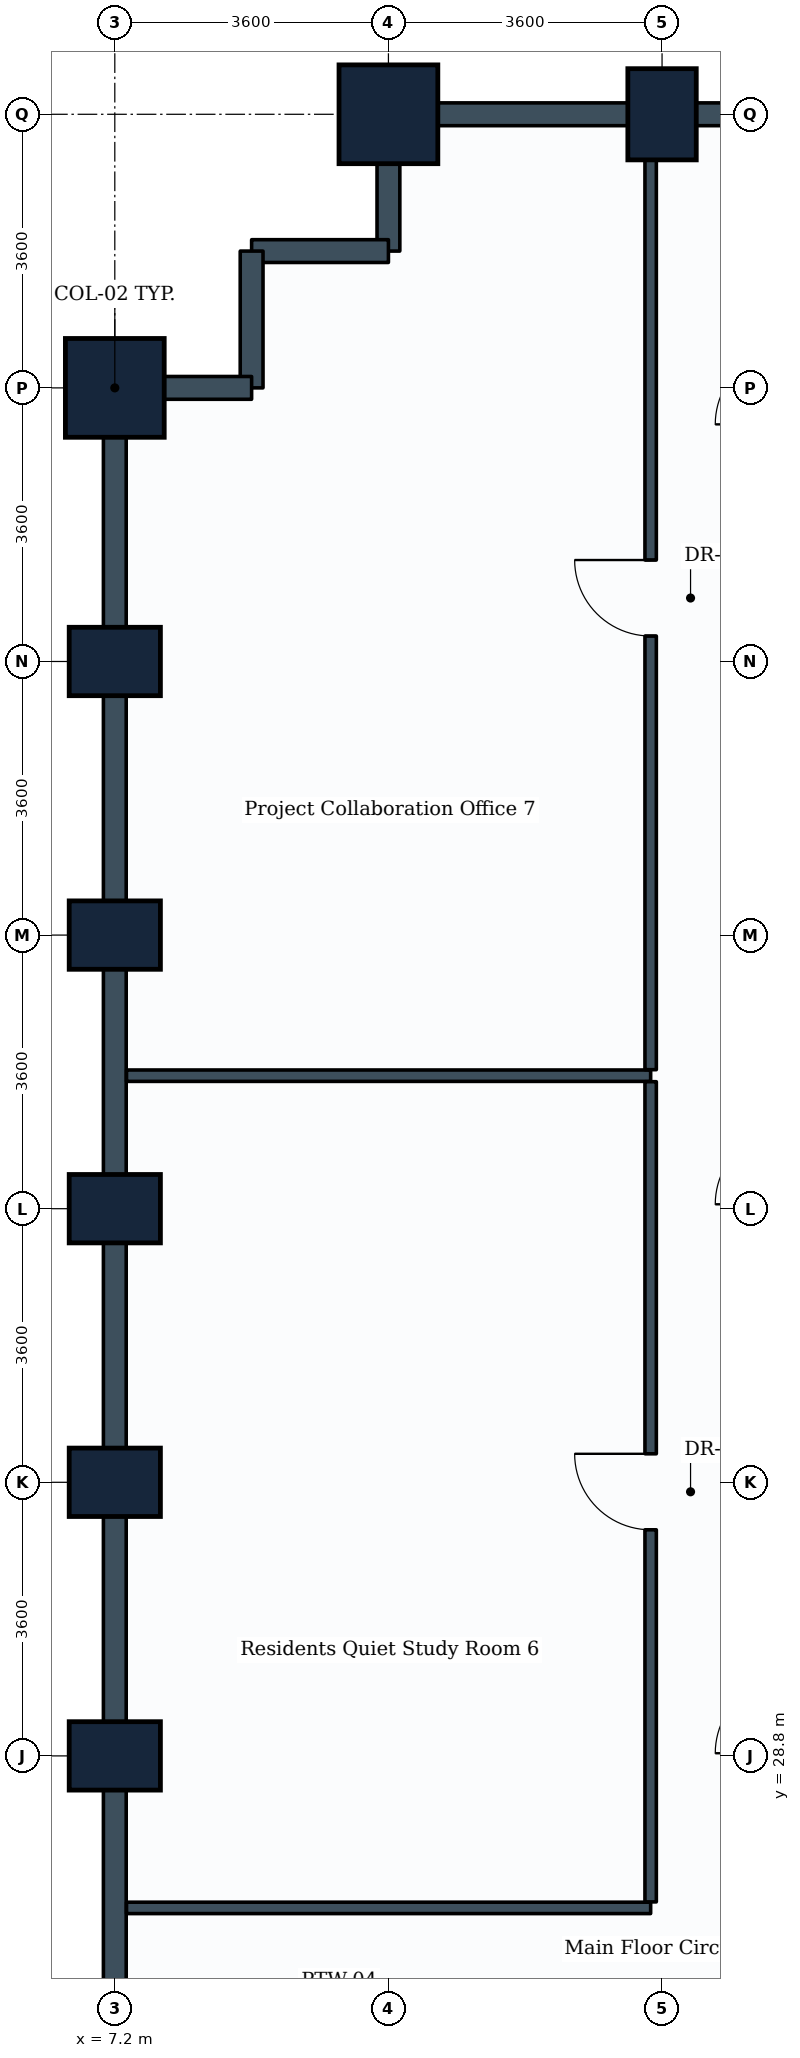
"""IFC4 building model, lengths in metres.
Left out: names, types, materials, properties, quantities, classifications, styles, units other than length and angle.
Written with IfcOpenShell. Run it as: python <this file> out.ifc"""

import sys

from ifc_helpers import new_model, si_unit, direction, frame, frame_2d, origin, origin_2d, place, context, subcontext, project, spatial, rectangle, extrude, element, fill, save


model = new_model("IFC4")
c1 = context("Model", 3, precision=1e-05, world=origin(), true_north=direction((0.0, 1.0)))
c2 = subcontext(c1, "Body", "Model", "MODEL_VIEW")
j1 = project(units=[si_unit("LENGTHUNIT", "METRE"), si_unit("PLANEANGLEUNIT", "RADIAN")], contexts=[c1])
p1 = place(None, origin())
s1 = spatial("IfcSite", under=j1, at=p1, CompositionType="ELEMENT")
p2 = place(p1, origin())
s2 = spatial("IfcBuilding", under=s1, at=p2, CompositionType="ELEMENT")
p3 = place(p2, frame((0.0, 0.0, 66.9)))
s3 = spatial("IfcBuildingStorey", under=s2, at=p3, CompositionType="ELEMENT", Elevation=66.9)
for number, where, z_axis, x_axis in (
    (1, (7.2, 28.8, 0.0), (0.0, 0.0, 1.0), (0.0, 1.0, 0.0)),
    (2, (7.2, 32.4, 0.0), (0.0, 0.0, 1.0), (0.0, 1.0, 0.0)),
    (3, (7.2, 36.0, 0.0), (0.0, 0.0, 1.0), (0.0, 1.0, 0.0)),
    (4, (7.2, 39.6, 0.0), (0.0, 0.0, 1.0), (0.0, 1.0, 0.0)),
    (5, (7.2, 43.2, 0.0), (0.0, 0.0, 1.0), (0.0, 1.0, 0.0)),
):
    element("IfcColumn", number, at=place(p3, frame(where, z_axis=z_axis, x_axis=x_axis)), inside=s3, PredefinedType="COLUMN", context=c2, shape_type="SweptSolid", body=[
        extrude(rectangle(XDim=0.9, YDim=1.2, at=origin_2d()), origin(), (0.0, 0.0, 1.0), 3.9),
    ])
for number, where, z_axis, x_axis in (
    (6, (7.2, 46.8, 0.0), (0.0, 0.0, 1.0), (0.0, 1.0, 0.0)),
    (7, (10.8, 50.4, 0.0), (0.0, 0.0, 1.0), (1.0, 0.0, 0.0)),
):
    element("IfcColumn", number, at=place(p3, frame(where, z_axis=z_axis, x_axis=x_axis)), inside=s3, PredefinedType="COLUMN", context=c2, shape_type="SweptSolid", body=[
        extrude(rectangle(XDim=1.3, YDim=1.3, at=origin_2d()), origin(), (0.0, 0.0, 1.0), 3.9),
    ])
p4 = place(p3, frame((14.4, 50.4, 0.0), z_axis=(0.0, 0.0, 1.0), x_axis=(1.0, 0.0, 0.0)))
e8 = element("IfcColumn", 8, at=p4, inside=s3, PredefinedType="COLUMN", context=c2, shape_type="SweptSolid", body=[
    extrude(rectangle(XDim=0.9, YDim=1.2, at=origin_2d()), origin(), (0.0, 0.0, 1.0), 3.9),
])
p5 = place(p3, frame((14.4, 50.4, 0.0), z_axis=(0.0, 0.0, 1.0), x_axis=(1.0, 0.0, 0.0)))
e9 = element("IfcWall", 9, at=p5, inside=s3, PredefinedType="STANDARD", context=c2, shape_type="SweptSolid", body=[
    extrude(rectangle(XDim=3.6, YDim=0.3, at=frame_2d((1.8, 0.0))), origin(), (0.0, 0.0, 1.0), 2.93),
])
p6 = place(p3, frame((10.8, 50.4, 0.0), z_axis=(0.0, 0.0, 1.0), x_axis=(1.0, 0.0, 0.0)))
e10 = element("IfcWall", 10, at=p6, inside=s3, PredefinedType="STANDARD", context=c2, shape_type="SweptSolid", body=[
    extrude(rectangle(XDim=3.6, YDim=0.3, at=frame_2d((1.8, 0.0))), origin(), (0.0, 0.0, 1.0), 2.93),
])
p7 = place(p3, frame((10.8, 48.6, 0.0), z_axis=(0.0, 0.0, 1.0), x_axis=(0.0, 1.0, 0.0)))
e11 = element("IfcWall", 11, at=p7, inside=s3, PredefinedType="STANDARD", context=c2, shape_type="SweptSolid", body=[
    extrude(rectangle(XDim=1.8, YDim=0.3, at=frame_2d((0.9, 0.0))), origin(), (0.0, 0.0, 1.0), 2.93),
])
for number, where, z_axis, x_axis in (
    (12, (9.0, 48.6, 0.0), (0.0, 0.0, 1.0), (1.0, 0.0, 0.0)),
    (13, (9.0, 46.8, 0.0), (0.0, 0.0, 1.0), (0.0, 1.0, 0.0)),
):
    element("IfcWall", number, at=place(p3, frame(where, z_axis=z_axis, x_axis=x_axis)), inside=s3, PredefinedType="STANDARD", context=c2, shape_type="SweptSolid", body=[
        extrude(rectangle(XDim=1.8, YDim=0.3, at=frame_2d((0.9, 0.0))), origin(), (0.0, 0.0, 1.0), 3.635),
    ])
p8 = place(p3, frame((7.2, 46.8, 0.0), z_axis=(0.0, 0.0, 1.0), x_axis=(1.0, 0.0, 0.0)))
e14 = element("IfcWall", 14, at=p8, inside=s3, PredefinedType="STANDARD", context=c2, shape_type="SweptSolid", body=[
    extrude(rectangle(XDim=1.8, YDim=0.3, at=frame_2d((0.9, 0.0))), origin(), (0.0, 0.0, 1.0), 2.93),
])
p9 = place(p3, frame((7.2, 43.2, 0.0), z_axis=(0.0, 0.0, 1.0), x_axis=(0.0, 1.0, 0.0)))
e15 = element("IfcWall", 15, at=p9, inside=s3, PredefinedType="STANDARD", context=c2, shape_type="SweptSolid", body=[
    extrude(rectangle(XDim=3.6, YDim=0.3, at=frame_2d((1.8, 0.0))), origin(), (0.0, 0.0, 1.0), 2.93),
])
p10 = place(p3, frame((7.2, 39.6, 0.0), z_axis=(0.0, 0.0, 1.0), x_axis=(0.0, 1.0, 0.0)))
e16 = element("IfcWall", 16, at=p10, inside=s3, PredefinedType="STANDARD", context=c2, shape_type="SweptSolid", body=[
    extrude(rectangle(XDim=3.6, YDim=0.3, at=frame_2d((1.8, 0.0))), origin(), (0.0, 0.0, 1.0), 2.93),
])
for number, where, z_axis, x_axis in (
    (17, (7.2, 36.0, 0.0), (0.0, 0.0, 1.0), (0.0, 1.0, 0.0)),
    (18, (7.2, 32.4, 0.0), (0.0, 0.0, 1.0), (0.0, 1.0, 0.0)),
):
    element("IfcWall", number, at=place(p3, frame(where, z_axis=z_axis, x_axis=x_axis)), inside=s3, PredefinedType="STANDARD", context=c2, shape_type="SweptSolid", body=[
        extrude(rectangle(XDim=3.6, YDim=0.3, at=frame_2d((1.8, 0.0))), origin(), (0.0, 0.0, 1.0), 2.93),
    ])
p11 = place(p3, frame((7.2, 28.8, 0.0), z_axis=(0.0, 0.0, 1.0), x_axis=(0.0, 1.0, 0.0)))
e19 = element("IfcWall", 19, at=p11, inside=s3, PredefinedType="STANDARD", context=c2, shape_type="SweptSolid", body=[
    extrude(rectangle(XDim=3.6, YDim=0.3, at=frame_2d((1.8, 0.0))), origin(), (0.0, 0.0, 1.0), 2.93),
])
p12 = place(p3, frame((7.2, 25.2, 0.0), z_axis=(0.0, 0.0, 1.0), x_axis=(0.0, 1.0, 0.0)))
e20 = element("IfcWall", 20, at=p12, inside=s3, PredefinedType="STANDARD", context=c2, shape_type="SweptSolid", body=[
    extrude(rectangle(XDim=3.6, YDim=0.3, at=frame_2d((1.8, 0.0))), origin(), (0.0, 0.0, 1.0), 2.93),
])
for number, where, z_axis, x_axis in (
    (21, (7.354, 26.8, 0.0), (0.0, 0.0, 1.0), (1.0, 0.0, 0.0)),
    (22, (7.354, 37.75, 0.0), (0.0, 0.0, 1.0), (1.0, 0.0, 0.0)),
):
    element("IfcWall", number, at=place(p3, frame(where, z_axis=z_axis, x_axis=x_axis)), inside=s3, PredefinedType="PARTITIONING", context=c2, shape_type="SweptSolid", body=[
        extrude(rectangle(XDim=6.896, YDim=0.15, at=frame_2d((3.448, 0.0))), origin(), (0.0, 0.0, 1.0), 2.93),
    ])
p13 = place(p3, frame((14.25, 26.879, 0.0), z_axis=(0.0, 0.0, 1.0), x_axis=(0.0, 1.0, 0.0)))
e23 = element("IfcWall", 23, at=p13, inside=s3, PredefinedType="PARTITIONING", context=c2, shape_type="SweptSolid", body=[
    extrude(rectangle(XDim=10.792, YDim=0.15, at=frame_2d((5.396, 0.0))), origin(), (0.0, 0.0, 1.0), 3.03),
])
p14 = place(p13, frame((4.896, 0.0, 0.0)))
e24 = element("IfcOpeningElement", 24, at=p14, cuts=e23, PredefinedType="OPENING", context=c2, shape_type="SweptSolid", body=[
    extrude(rectangle(XDim=1.0, YDim=2.1, at=frame_2d((0.5, 1.05))), frame((0.0, 0.085, 0.0), z_axis=(0.0, -1.0, 0.0), x_axis=(1.0, 0.0, 0.0)), (0.0, 0.0, 1.0), 0.17),
])
p15 = place(p3, frame((14.25, 37.829, 0.0), z_axis=(0.0, 0.0, 1.0), x_axis=(0.0, 1.0, 0.0)))
e25 = element("IfcWall", 25, at=p15, inside=s3, PredefinedType="PARTITIONING", context=c2, shape_type="SweptSolid", body=[
    extrude(rectangle(XDim=12.417, YDim=0.15, at=frame_2d((6.208, 0.0))), origin(), (0.0, 0.0, 1.0), 2.93),
])
p16 = place(p15, frame((5.706, 0.0, 0.0)))
e26 = element("IfcOpeningElement", 26, at=p16, cuts=e25, PredefinedType="OPENING", context=c2, shape_type="SweptSolid", body=[
    extrude(rectangle(XDim=1.0, YDim=2.1, at=frame_2d((0.5, 1.05))), frame((0.0, 0.085, 0.0), z_axis=(0.0, -1.0, 0.0), x_axis=(1.0, 0.0, 0.0)), (0.0, 0.0, 1.0), 0.17),
])
p17 = place(p14, origin())
e27 = element("IfcDoor", 27, at=p17, inside=s3, OperationType="SINGLE_SWING_RIGHT", PredefinedType="DOOR", context=c2, shape_type="SweptSolid", body=[
    extrude(rectangle(XDim=1.0, YDim=2.1, at=frame_2d((0.5, 1.05))), frame((0.0, 0.025, 0.0), z_axis=(0.0, -1.0, 0.0), x_axis=(1.0, 0.0, 0.0)), (0.0, 0.0, 1.0), 0.05),
])
fill(e24, e27)
p18 = place(p16, origin())
e28 = element("IfcDoor", 28, at=p18, inside=s3, OperationType="SINGLE_SWING_RIGHT", PredefinedType="DOOR", context=c2, shape_type="SweptSolid", body=[
    extrude(rectangle(XDim=1.0, YDim=2.1, at=frame_2d((0.5, 1.05))), frame((0.0, 0.025, 0.0), z_axis=(0.0, -1.0, 0.0), x_axis=(1.0, 0.0, 0.0)), (0.0, 0.0, 1.0), 0.05),
])
fill(e26, e28)
save(model, sys.argv[1])
